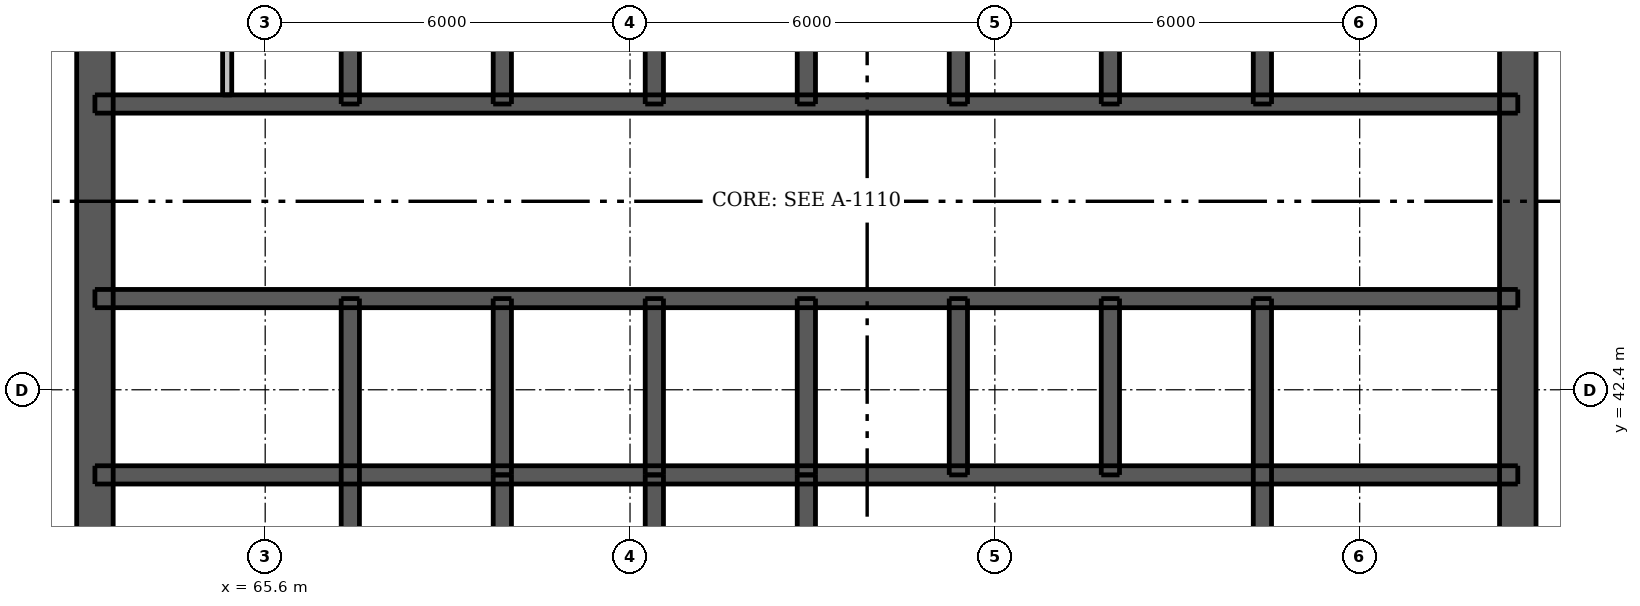
"""IFC4 building model, lengths in metres.
Left out: names, types, materials, properties, quantities, classifications, styles, units other than length and angle.
Written with IfcOpenShell. Run it as: python <this file> out.ifc"""

import sys

from ifc_helpers import new_model, si_unit, direction, frame, frame_2d, origin, place, context, subcontext, project, spatial, rectangle, extrude, element, fill, save


model = new_model("IFC4")
c1 = context("Model", 3, precision=1e-05, world=origin(), true_north=direction((0.0, 1.0)))
c2 = subcontext(c1, "Body", "Model", "MODEL_VIEW")
j1 = project(units=[si_unit("LENGTHUNIT", "METRE"), si_unit("PLANEANGLEUNIT", "RADIAN")], contexts=[c1])
p1 = place(None, origin())
s1 = spatial("IfcSite", under=j1, at=p1, CompositionType="ELEMENT")
p2 = place(p1, origin())
s2 = spatial("IfcBuilding", under=s1, at=p2, CompositionType="ELEMENT")
p3 = place(p2, frame((0.0, 0.0, 196.9)))
s3 = spatial("IfcBuildingStorey", under=s2, at=p3, CompositionType="ELEMENT", Elevation=196.9)
p4 = place(p3, frame((62.8, 33.5, 0.0), z_axis=(0.0, 0.0, 1.0), x_axis=(0.0, 1.0, 0.0)))
e1 = element("IfcWall", 1, at=p4, inside=s3, PredefinedType="SHEAR", context=c2, shape_type="SweptSolid", body=[
    extrude(rectangle(XDim=24.0, YDim=0.6, at=frame_2d((12.0, 0.0))), origin(), (0.0, 0.0, 1.0), 3.05),
])
p5 = place(p4, frame((11.2, 0.0, 0.0)))
e2 = element("IfcOpeningElement", 2, at=p5, cuts=e1, PredefinedType="OPENING", context=c2, shape_type="SweptSolid", body=[
    extrude(rectangle(XDim=1.6, YDim=2.1, at=frame_2d((0.8, 1.05))), frame((0.0, 0.31, 0.0), z_axis=(0.0, -1.0, 0.0), x_axis=(1.0, 0.0, 0.0)), (0.0, 0.0, 1.0), 0.62),
])
p6 = place(p3, frame((86.2, 33.5, 0.0), z_axis=(0.0, 0.0, 1.0), x_axis=(0.0, 1.0, 0.0)))
e3 = element("IfcWall", 3, at=p6, inside=s3, PredefinedType="SHEAR", context=c2, shape_type="SweptSolid", body=[
    extrude(rectangle(XDim=24.0, YDim=0.6, at=frame_2d((12.0, 0.0))), origin(), (0.0, 0.0, 1.0), 3.05),
])
p7 = place(p6, frame((11.2, 0.0, 0.0)))
e4 = element("IfcOpeningElement", 4, at=p7, cuts=e3, PredefinedType="OPENING", context=c2, shape_type="SweptSolid", body=[
    extrude(rectangle(XDim=1.6, YDim=2.1, at=frame_2d((0.8, 1.05))), frame((0.0, 0.31, 0.0), z_axis=(0.0, -1.0, 0.0), x_axis=(1.0, 0.0, 0.0)), (0.0, 0.0, 1.0), 0.62),
])
p8 = place(p3, frame((62.8, 41.0, 0.0), z_axis=(0.0, 0.0, 1.0), x_axis=(1.0, 0.0, 0.0)))
e5 = element("IfcWall", 5, at=p8, inside=s3, PredefinedType="SHEAR", context=c2, shape_type="SweptSolid", body=[
    extrude(rectangle(XDim=23.4, YDim=0.3, at=frame_2d((11.7, 0.0))), origin(), (0.0, 0.0, 1.0), 3.05),
])
p9 = place(p3, frame((62.8, 43.9, 0.0), z_axis=(0.0, 0.0, 1.0), x_axis=(1.0, 0.0, 0.0)))
e6 = element("IfcWall", 6, at=p9, inside=s3, PredefinedType="SHEAR", context=c2, shape_type="SweptSolid", body=[
    extrude(rectangle(XDim=23.4, YDim=0.3, at=frame_2d((11.7, 0.0))), origin(), (0.0, 0.0, 1.0), 3.05),
])
p10 = place(p9, frame((1.725, 0.0, 0.0)))
e7 = element("IfcOpeningElement", 7, at=p10, cuts=e6, PredefinedType="OPENING", context=c2, shape_type="SweptSolid", body=[
    extrude(rectangle(XDim=0.9, YDim=2.1, at=frame_2d((0.45, 1.05))), frame((0.0, 0.16, 0.0), z_axis=(0.0, -1.0, 0.0), x_axis=(1.0, 0.0, 0.0)), (0.0, 0.0, 1.0), 0.32),
])
p11 = place(p9, frame((20.775, 0.0, 0.0)))
e8 = element("IfcOpeningElement", 8, at=p11, cuts=e6, PredefinedType="OPENING", context=c2, shape_type="SweptSolid", body=[
    extrude(rectangle(XDim=0.9, YDim=2.1, at=frame_2d((0.45, 1.05))), frame((0.0, 0.16, 0.0), z_axis=(0.0, -1.0, 0.0), x_axis=(1.0, 0.0, 0.0)), (0.0, 0.0, 1.0), 0.32),
])
p12 = place(p9, frame((5.0, 0.0, 0.0)))
e9 = element("IfcOpeningElement", 9, at=p12, cuts=e6, PredefinedType="OPENING", context=c2, shape_type="SweptSolid", body=[
    extrude(rectangle(XDim=0.9, YDim=2.1, at=frame_2d((0.45, 1.05))), frame((0.0, 0.16, 0.0), z_axis=(0.0, -1.0, 0.0), x_axis=(1.0, 0.0, 0.0)), (0.0, 0.0, 1.0), 0.32),
])
p13 = place(p9, frame((7.5, 0.0, 0.0)))
e10 = element("IfcOpeningElement", 10, at=p13, cuts=e6, PredefinedType="OPENING", context=c2, shape_type="SweptSolid", body=[
    extrude(rectangle(XDim=0.9, YDim=2.1, at=frame_2d((0.45, 1.05))), frame((0.0, 0.16, 0.0), z_axis=(0.0, -1.0, 0.0), x_axis=(1.0, 0.0, 0.0)), (0.0, 0.0, 1.0), 0.32),
])
p14 = place(p9, frame((12.5, 0.0, 0.0)))
e11 = element("IfcOpeningElement", 11, at=p14, cuts=e6, PredefinedType="OPENING", context=c2, shape_type="SweptSolid", body=[
    extrude(rectangle(XDim=0.9, YDim=2.1, at=frame_2d((0.45, 1.05))), frame((0.0, 0.16, 0.0), z_axis=(0.0, -1.0, 0.0), x_axis=(1.0, 0.0, 0.0)), (0.0, 0.0, 1.0), 0.32),
])
p15 = place(p9, frame((15.0, 0.0, 0.0)))
e12 = element("IfcOpeningElement", 12, at=p15, cuts=e6, PredefinedType="OPENING", context=c2, shape_type="SweptSolid", body=[
    extrude(rectangle(XDim=0.9, YDim=2.1, at=frame_2d((0.45, 1.05))), frame((0.0, 0.16, 0.0), z_axis=(0.0, -1.0, 0.0), x_axis=(1.0, 0.0, 0.0)), (0.0, 0.0, 1.0), 0.32),
])
p16 = place(p3, frame((62.8, 47.1, 0.0), z_axis=(0.0, 0.0, 1.0), x_axis=(1.0, 0.0, 0.0)))
e13 = element("IfcWall", 13, at=p16, inside=s3, PredefinedType="SHEAR", context=c2, shape_type="SweptSolid", body=[
    extrude(rectangle(XDim=23.4, YDim=0.3, at=frame_2d((11.7, 0.0))), origin(), (0.0, 0.0, 1.0), 3.05),
])
p17 = place(p16, frame((0.788, 0.0, 0.0)))
e14 = element("IfcOpeningElement", 14, at=p17, cuts=e13, PredefinedType="OPENING", context=c2, shape_type="SweptSolid", body=[
    extrude(rectangle(XDim=0.9, YDim=2.1, at=frame_2d((0.45, 1.05))), frame((0.0, 0.16, 0.0), z_axis=(0.0, -1.0, 0.0), x_axis=(1.0, 0.0, 0.0)), (0.0, 0.0, 1.0), 0.32),
])
p18 = place(p16, frame((2.663, 0.0, 0.0)))
e15 = element("IfcOpeningElement", 15, at=p18, cuts=e13, PredefinedType="OPENING", context=c2, shape_type="SweptSolid", body=[
    extrude(rectangle(XDim=0.9, YDim=2.1, at=frame_2d((0.45, 1.05))), frame((0.0, 0.16, 0.0), z_axis=(0.0, -1.0, 0.0), x_axis=(1.0, 0.0, 0.0)), (0.0, 0.0, 1.0), 0.32),
])
p19 = place(p16, frame((20.775, 0.0, 0.0)))
e16 = element("IfcOpeningElement", 16, at=p19, cuts=e13, PredefinedType="OPENING", context=c2, shape_type="SweptSolid", body=[
    extrude(rectangle(XDim=0.9, YDim=2.1, at=frame_2d((0.45, 1.05))), frame((0.0, 0.16, 0.0), z_axis=(0.0, -1.0, 0.0), x_axis=(1.0, 0.0, 0.0)), (0.0, 0.0, 1.0), 0.32),
])
p20 = place(p16, frame((4.9, 0.0, 0.0)))
e17 = element("IfcOpeningElement", 17, at=p20, cuts=e13, PredefinedType="OPENING", context=c2, shape_type="SweptSolid", body=[
    extrude(rectangle(XDim=1.1, YDim=2.1, at=frame_2d((0.55, 1.05))), frame((0.0, 0.16, 0.0), z_axis=(0.0, -1.0, 0.0), x_axis=(1.0, 0.0, 0.0)), (0.0, 0.0, 1.0), 0.32),
])
p21 = place(p16, frame((7.4, 0.0, 0.0)))
e18 = element("IfcOpeningElement", 18, at=p21, cuts=e13, PredefinedType="OPENING", context=c2, shape_type="SweptSolid", body=[
    extrude(rectangle(XDim=1.1, YDim=2.1, at=frame_2d((0.55, 1.05))), frame((0.0, 0.16, 0.0), z_axis=(0.0, -1.0, 0.0), x_axis=(1.0, 0.0, 0.0)), (0.0, 0.0, 1.0), 0.32),
])
p22 = place(p16, frame((9.9, 0.0, 0.0)))
e19 = element("IfcOpeningElement", 19, at=p22, cuts=e13, PredefinedType="OPENING", context=c2, shape_type="SweptSolid", body=[
    extrude(rectangle(XDim=1.1, YDim=2.1, at=frame_2d((0.55, 1.05))), frame((0.0, 0.16, 0.0), z_axis=(0.0, -1.0, 0.0), x_axis=(1.0, 0.0, 0.0)), (0.0, 0.0, 1.0), 0.32),
])
p23 = place(p16, frame((12.4, 0.0, 0.0)))
e20 = element("IfcOpeningElement", 20, at=p23, cuts=e13, PredefinedType="OPENING", context=c2, shape_type="SweptSolid", body=[
    extrude(rectangle(XDim=1.1, YDim=2.1, at=frame_2d((0.55, 1.05))), frame((0.0, 0.16, 0.0), z_axis=(0.0, -1.0, 0.0), x_axis=(1.0, 0.0, 0.0)), (0.0, 0.0, 1.0), 0.32),
])
p24 = place(p16, frame((14.9, 0.0, 0.0)))
e21 = element("IfcOpeningElement", 21, at=p24, cuts=e13, PredefinedType="OPENING", context=c2, shape_type="SweptSolid", body=[
    extrude(rectangle(XDim=1.1, YDim=2.1, at=frame_2d((0.55, 1.05))), frame((0.0, 0.16, 0.0), z_axis=(0.0, -1.0, 0.0), x_axis=(1.0, 0.0, 0.0)), (0.0, 0.0, 1.0), 0.32),
])
p25 = place(p16, frame((17.4, 0.0, 0.0)))
e22 = element("IfcOpeningElement", 22, at=p25, cuts=e13, PredefinedType="OPENING", context=c2, shape_type="SweptSolid", body=[
    extrude(rectangle(XDim=1.1, YDim=2.1, at=frame_2d((0.55, 1.05))), frame((0.0, 0.16, 0.0), z_axis=(0.0, -1.0, 0.0), x_axis=(1.0, 0.0, 0.0)), (0.0, 0.0, 1.0), 0.32),
])
p26 = place(p3, frame((67.0, 33.8, 0.0), z_axis=(0.0, 0.0, 1.0), x_axis=(0.0, 1.0, 0.0)))
e23 = element("IfcWall", 23, at=p26, inside=s3, PredefinedType="SHEAR", context=c2, shape_type="SweptSolid", body=[
    extrude(rectangle(XDim=10.1, YDim=0.3, at=frame_2d((5.05, 0.0))), origin(), (0.0, 0.0, 1.0), 3.05),
])
p27 = place(p26, frame((0.5, 0.0, 0.0)))
e24 = element("IfcOpeningElement", 24, at=p27, cuts=e23, PredefinedType="OPENING", context=c2, shape_type="SweptSolid", body=[
    extrude(rectangle(XDim=1.1, YDim=2.1, at=frame_2d((0.55, 1.05))), frame((0.0, 0.16, 0.0), z_axis=(0.0, -1.0, 0.0), x_axis=(1.0, 0.0, 0.0)), (0.0, 0.0, 1.0), 0.32),
])
for number, where, z_axis, x_axis in (
    (25, (67.0, 47.1, 0.0), (0.0, 0.0, 1.0), (0.0, 1.0, 0.0)),
    (26, (82.0, 33.8, 0.0), (0.0, 0.0, 1.0), (0.0, 1.0, 0.0)),
    (27, (82.0, 47.1, 0.0), (0.0, 0.0, 1.0), (0.0, 1.0, 0.0)),
):
    element("IfcWall", number, at=place(p3, frame(where, z_axis=z_axis, x_axis=x_axis)), inside=s3, PredefinedType="SHEAR", context=c2, shape_type="SweptSolid", body=[
        extrude(rectangle(XDim=10.1, YDim=0.3, at=frame_2d((5.05, 0.0))), origin(), (0.0, 0.0, 1.0), 3.05),
    ])
for number, where, z_axis, x_axis in (
    (28, (69.5, 41.0, 0.0), (0.0, 0.0, 1.0), (0.0, 1.0, 0.0)),
    (29, (69.5, 47.1, 0.0), (0.0, 0.0, 1.0), (0.0, 1.0, 0.0)),
    (30, (72.0, 41.0, 0.0), (0.0, 0.0, 1.0), (0.0, 1.0, 0.0)),
    (31, (72.0, 47.1, 0.0), (0.0, 0.0, 1.0), (0.0, 1.0, 0.0)),
    (32, (74.5, 41.0, 0.0), (0.0, 0.0, 1.0), (0.0, 1.0, 0.0)),
    (33, (74.5, 47.1, 0.0), (0.0, 0.0, 1.0), (0.0, 1.0, 0.0)),
    (34, (77.0, 41.0, 0.0), (0.0, 0.0, 1.0), (0.0, 1.0, 0.0)),
    (35, (77.0, 47.1, 0.0), (0.0, 0.0, 1.0), (0.0, 1.0, 0.0)),
    (36, (79.5, 41.0, 0.0), (0.0, 0.0, 1.0), (0.0, 1.0, 0.0)),
    (37, (79.5, 47.1, 0.0), (0.0, 0.0, 1.0), (0.0, 1.0, 0.0)),
    (38, (69.5, 38.1, 0.0), (0.0, 0.0, 1.0), (0.0, 1.0, 0.0)),
    (39, (72.0, 38.1, 0.0), (0.0, 0.0, 1.0), (0.0, 1.0, 0.0)),
    (40, (74.5, 38.1, 0.0), (0.0, 0.0, 1.0), (0.0, 1.0, 0.0)),
):
    element("IfcWall", number, at=place(p3, frame(where, z_axis=z_axis, x_axis=x_axis)), inside=s3, PredefinedType="SHEAR", context=c2, shape_type="SweptSolid", body=[
        extrude(rectangle(XDim=2.9, YDim=0.3, at=frame_2d((1.45, 0.0))), origin(), (0.0, 0.0, 1.0), 3.05),
    ])
p28 = place(p3, frame((64.975, 47.25, 0.0), z_axis=(0.0, 0.0, 1.0), x_axis=(0.0, 1.0, 0.0)))
e41 = element("IfcWall", 41, at=p28, inside=s3, PredefinedType="PLUMBINGWALL", context=c2, shape_type="SweptSolid", body=[
    extrude(rectangle(XDim=2.6, YDim=0.15, at=frame_2d((1.3, 0.0))), origin(), (0.0, 0.0, 1.0), 3.05),
])
p29 = place(p5, origin())
e42 = element("IfcDoor", 42, at=p29, inside=s3, OperationType="DOUBLE_DOOR_SINGLE_SWING", PredefinedType="DOOR", context=c2, shape_type="SweptSolid", body=[
    extrude(rectangle(XDim=1.6, YDim=2.1, at=frame_2d((0.8, 1.05))), frame((0.0, -0.237, 0.0), z_axis=(0.0, -1.0, 0.0), x_axis=(1.0, 0.0, 0.0)), (0.0, 0.0, 1.0), 0.05),
])
fill(e2, e42)
p30 = place(p7, origin())
e43 = element("IfcDoor", 43, at=p30, inside=s3, OperationType="DOUBLE_DOOR_SINGLE_SWING", PredefinedType="DOOR", context=c2, shape_type="SweptSolid", body=[
    extrude(rectangle(XDim=1.6, YDim=2.1, at=frame_2d((0.8, 1.05))), frame((0.0, 0.288, 0.0), z_axis=(0.0, -1.0, 0.0), x_axis=(1.0, 0.0, 0.0)), (0.0, 0.0, 1.0), 0.05),
])
fill(e4, e43)
p31 = place(p10, origin())
e44 = element("IfcDoor", 44, at=p31, inside=s3, OperationType="SINGLE_SWING_LEFT", PredefinedType="DOOR", context=c2, shape_type="SweptSolid", body=[
    extrude(rectangle(XDim=0.9, YDim=2.1, at=frame_2d((0.45, 1.05))), frame((0.0, -0.087, 0.0), z_axis=(0.0, -1.0, 0.0), x_axis=(1.0, 0.0, 0.0)), (0.0, 0.0, 1.0), 0.05),
])
fill(e7, e44)
p32 = place(p11, origin())
e45 = element("IfcDoor", 45, at=p32, inside=s3, OperationType="SINGLE_SWING_LEFT", PredefinedType="DOOR", context=c2, shape_type="SweptSolid", body=[
    extrude(rectangle(XDim=0.9, YDim=2.1, at=frame_2d((0.45, 1.05))), frame((0.0, -0.087, 0.0), z_axis=(0.0, -1.0, 0.0), x_axis=(1.0, 0.0, 0.0)), (0.0, 0.0, 1.0), 0.05),
])
fill(e8, e45)
p33 = place(p17, origin())
e46 = element("IfcDoor", 46, at=p33, inside=s3, OperationType="SINGLE_SWING_LEFT", PredefinedType="DOOR", context=c2, shape_type="SweptSolid", body=[
    extrude(rectangle(XDim=0.9, YDim=2.1, at=frame_2d((0.45, 1.05))), frame((0.0, 0.138, 0.0), z_axis=(0.0, -1.0, 0.0), x_axis=(1.0, 0.0, 0.0)), (0.0, 0.0, 1.0), 0.05),
])
fill(e14, e46)
p34 = place(p18, origin())
e47 = element("IfcDoor", 47, at=p34, inside=s3, OperationType="SINGLE_SWING_RIGHT", PredefinedType="DOOR", context=c2, shape_type="SweptSolid", body=[
    extrude(rectangle(XDim=0.9, YDim=2.1, at=frame_2d((0.45, 1.05))), frame((0.0, 0.138, 0.0), z_axis=(0.0, -1.0, 0.0), x_axis=(1.0, 0.0, 0.0)), (0.0, 0.0, 1.0), 0.05),
])
fill(e15, e47)
p35 = place(p19, origin())
e48 = element("IfcDoor", 48, at=p35, inside=s3, OperationType="SINGLE_SWING_LEFT", PredefinedType="DOOR", context=c2, shape_type="SweptSolid", body=[
    extrude(rectangle(XDim=0.9, YDim=2.1, at=frame_2d((0.45, 1.05))), frame((0.0, 0.138, 0.0), z_axis=(0.0, -1.0, 0.0), x_axis=(1.0, 0.0, 0.0)), (0.0, 0.0, 1.0), 0.05),
])
fill(e16, e48)
p36 = place(p12, origin())
e49 = element("IfcDoor", 49, at=p36, inside=s3, OperationType="SINGLE_SWING_RIGHT", PredefinedType="DOOR", context=c2, shape_type="SweptSolid", body=[
    extrude(rectangle(XDim=0.9, YDim=2.1, at=frame_2d((0.45, 1.05))), frame((0.0, -0.087, 0.0), z_axis=(0.0, -1.0, 0.0), x_axis=(1.0, 0.0, 0.0)), (0.0, 0.0, 1.0), 0.05),
])
fill(e9, e49)
p37 = place(p13, origin())
e50 = element("IfcDoor", 50, at=p37, inside=s3, OperationType="SINGLE_SWING_LEFT", PredefinedType="DOOR", context=c2, shape_type="SweptSolid", body=[
    extrude(rectangle(XDim=0.9, YDim=2.1, at=frame_2d((0.45, 1.05))), frame((0.0, -0.087, 0.0), z_axis=(0.0, -1.0, 0.0), x_axis=(1.0, 0.0, 0.0)), (0.0, 0.0, 1.0), 0.05),
])
fill(e10, e50)
p38 = place(p14, origin())
e51 = element("IfcDoor", 51, at=p38, inside=s3, OperationType="SINGLE_SWING_LEFT", PredefinedType="DOOR", context=c2, shape_type="SweptSolid", body=[
    extrude(rectangle(XDim=0.9, YDim=2.1, at=frame_2d((0.45, 1.05))), frame((0.0, -0.087, 0.0), z_axis=(0.0, -1.0, 0.0), x_axis=(1.0, 0.0, 0.0)), (0.0, 0.0, 1.0), 0.05),
])
fill(e11, e51)
p39 = place(p15, origin())
e52 = element("IfcDoor", 52, at=p39, inside=s3, OperationType="SINGLE_SWING_RIGHT", PredefinedType="DOOR", context=c2, shape_type="SweptSolid", body=[
    extrude(rectangle(XDim=0.9, YDim=2.1, at=frame_2d((0.45, 1.05))), frame((0.0, -0.087, 0.0), z_axis=(0.0, -1.0, 0.0), x_axis=(1.0, 0.0, 0.0)), (0.0, 0.0, 1.0), 0.05),
])
fill(e12, e52)
p40 = place(p20, origin())
e53 = element("IfcDoor", 53, at=p40, inside=s3, OperationType="DOUBLE_DOOR_SLIDING", PredefinedType="DOOR", context=c2, shape_type="SweptSolid", body=[
    extrude(rectangle(XDim=1.1, YDim=2.1, at=frame_2d((0.55, 1.05))), frame((0.0, 0.025, 0.0), z_axis=(0.0, -1.0, 0.0), x_axis=(1.0, 0.0, 0.0)), (0.0, 0.0, 1.0), 0.05),
])
fill(e17, e53)
p41 = place(p21, origin())
e54 = element("IfcDoor", 54, at=p41, inside=s3, OperationType="DOUBLE_DOOR_SLIDING", PredefinedType="DOOR", context=c2, shape_type="SweptSolid", body=[
    extrude(rectangle(XDim=1.1, YDim=2.1, at=frame_2d((0.55, 1.05))), frame((0.0, 0.025, 0.0), z_axis=(0.0, -1.0, 0.0), x_axis=(1.0, 0.0, 0.0)), (0.0, 0.0, 1.0), 0.05),
])
fill(e18, e54)
p42 = place(p22, origin())
e55 = element("IfcDoor", 55, at=p42, inside=s3, OperationType="DOUBLE_DOOR_SLIDING", PredefinedType="DOOR", context=c2, shape_type="SweptSolid", body=[
    extrude(rectangle(XDim=1.1, YDim=2.1, at=frame_2d((0.55, 1.05))), frame((0.0, 0.025, 0.0), z_axis=(0.0, -1.0, 0.0), x_axis=(1.0, 0.0, 0.0)), (0.0, 0.0, 1.0), 0.05),
])
fill(e19, e55)
p43 = place(p23, origin())
e56 = element("IfcDoor", 56, at=p43, inside=s3, OperationType="DOUBLE_DOOR_SLIDING", PredefinedType="DOOR", context=c2, shape_type="SweptSolid", body=[
    extrude(rectangle(XDim=1.1, YDim=2.1, at=frame_2d((0.55, 1.05))), frame((0.0, 0.025, 0.0), z_axis=(0.0, -1.0, 0.0), x_axis=(1.0, 0.0, 0.0)), (0.0, 0.0, 1.0), 0.05),
])
fill(e20, e56)
p44 = place(p24, origin())
e57 = element("IfcDoor", 57, at=p44, inside=s3, OperationType="DOUBLE_DOOR_SLIDING", PredefinedType="DOOR", context=c2, shape_type="SweptSolid", body=[
    extrude(rectangle(XDim=1.1, YDim=2.1, at=frame_2d((0.55, 1.05))), frame((0.0, 0.025, 0.0), z_axis=(0.0, -1.0, 0.0), x_axis=(1.0, 0.0, 0.0)), (0.0, 0.0, 1.0), 0.05),
])
fill(e21, e57)
p45 = place(p25, origin())
e58 = element("IfcDoor", 58, at=p45, inside=s3, OperationType="DOUBLE_DOOR_SLIDING", PredefinedType="DOOR", context=c2, shape_type="SweptSolid", body=[
    extrude(rectangle(XDim=1.1, YDim=2.1, at=frame_2d((0.55, 1.05))), frame((0.0, 0.025, 0.0), z_axis=(0.0, -1.0, 0.0), x_axis=(1.0, 0.0, 0.0)), (0.0, 0.0, 1.0), 0.05),
])
fill(e22, e58)
save(model, sys.argv[1])
